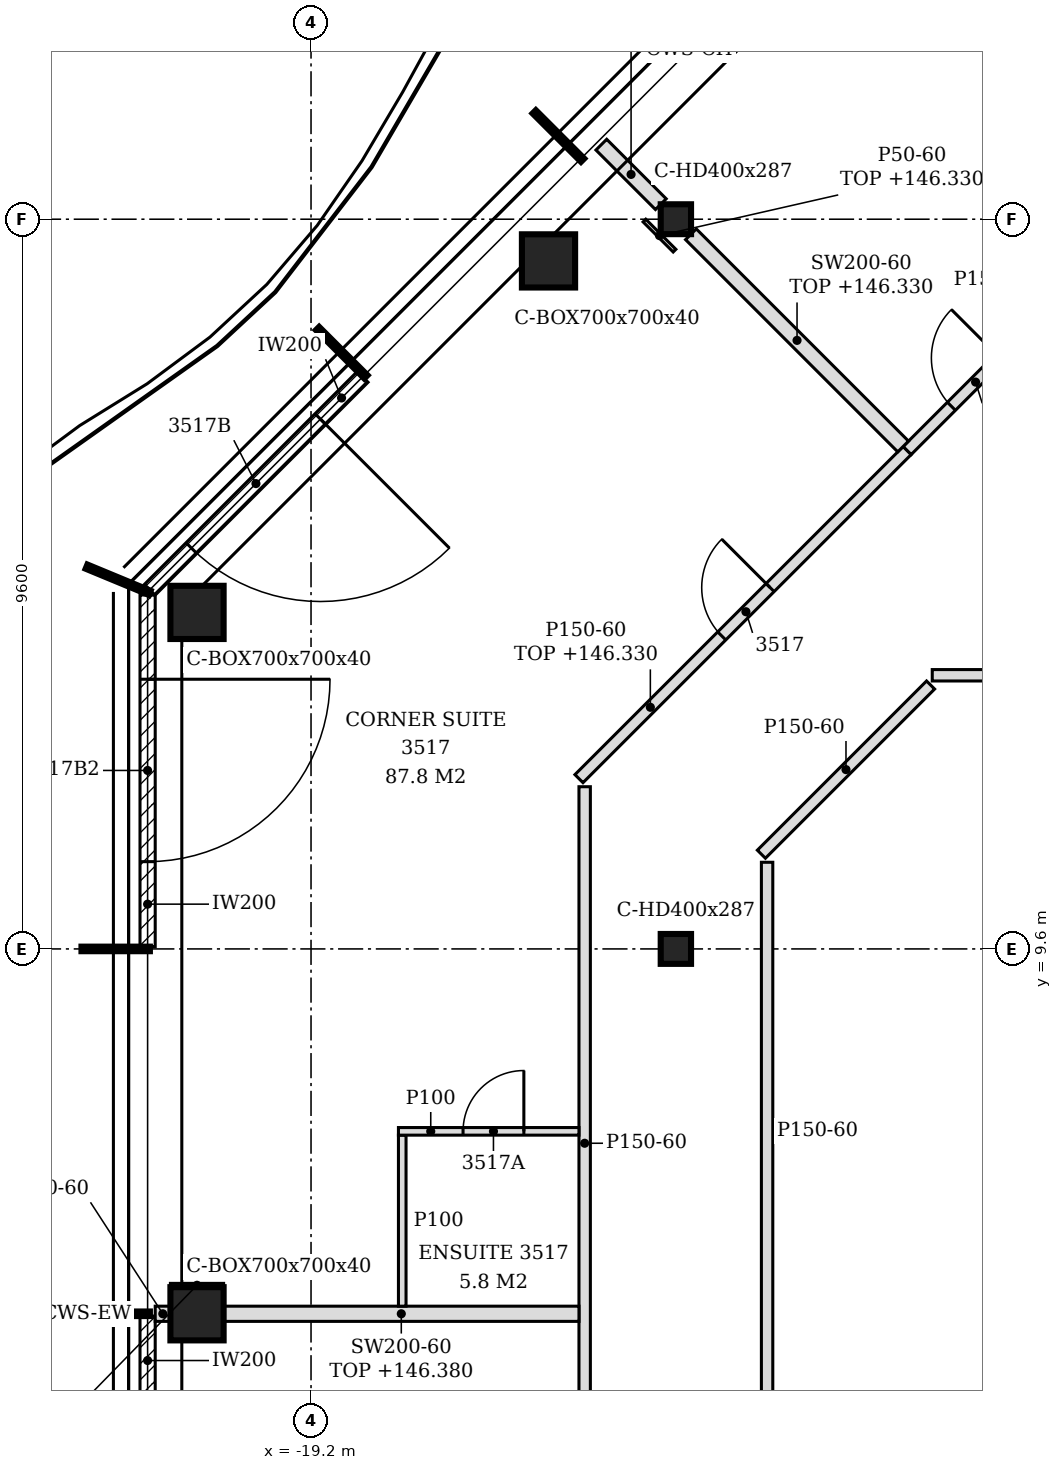
"""IFC4 building model, lengths in metres.
Left out: names, types, materials, properties, quantities, classifications, styles, units other than length and angle.
Written with IfcOpenShell. Run it as: python <this file> out.ifc"""

import sys

from ifc_helpers import new_model, si_unit, direction, frame, frame_2d, origin, origin_2d, place, context, subcontext, project, spatial, polyline, rectangle, hollow_rectangle, i_section, outline, extrude, element, fill, save


model = new_model("IFC4")
c1 = context("Model", 3, precision=1e-05, world=origin(), true_north=direction((0.0, 1.0)))
c2 = subcontext(c1, "Body", "Model", "MODEL_VIEW")
j1 = project(units=[si_unit("LENGTHUNIT", "METRE"), si_unit("PLANEANGLEUNIT", "RADIAN")], contexts=[c1])
p1 = place(None, origin())
s1 = spatial("IfcSite", under=j1, at=p1, CompositionType="ELEMENT")
p2 = place(p1, origin())
s2 = spatial("IfcBuilding", under=s1, at=p2, CompositionType="ELEMENT")
p3 = place(p2, frame((0.0, 0.0, 143.4)))
s3 = spatial("IfcBuildingStorey", under=s2, at=p3, CompositionType="ELEMENT", Elevation=143.4)
for number, where, z_axis, x_axis in (
    (1, (-16.076, 18.652, -0.15), (0.0, 0.0, 1.0), (1.0, 0.0, 0.0)),
    (2, (-20.7, 14.027, -0.15), (0.0, 0.0, 1.0), (1.0, 0.0, 0.0)),
    (3, (-20.7, 4.8, -0.15), (0.0, 0.0, 1.0), (1.0, 0.0, 0.0)),
):
    element("IfcColumn", number, at=place(p3, frame(where, z_axis=z_axis, x_axis=x_axis)), inside=s3, PredefinedType="COLUMN", context=c2, shape_type="SweptSolid", body=[
        extrude(hollow_rectangle(XDim=0.7, YDim=0.7, WallThickness=0.04, at=origin_2d()), origin(), (0.0, 0.0, 1.0), 3.6),
    ])
for number, where, z_axis, x_axis in (
    (4, (-14.4, 9.6, -0.15), (0.0, 0.0, 1.0), (1.0, 0.0, 0.0)),
    (5, (-14.4, 19.2, -0.15), (0.0, 0.0, 1.0), (1.0, 0.0, 0.0)),
):
    element("IfcColumn", number, at=place(p3, frame(where, z_axis=z_axis, x_axis=x_axis)), inside=s3, PredefinedType="COLUMN", context=c2, shape_type="SweptSolid", body=[
        extrude(i_section(OverallWidth=0.399, OverallDepth=0.393, WebThickness=0.023, FlangeThickness=0.037, FilletRadius=0.015, at=origin_2d()), origin(), (0.0, 0.0, 1.0), 3.6),
    ])
p4 = place(p3, frame((-18.521, 17.126, 0.0), z_axis=(0.0, 0.0, 1.0), x_axis=(-0.707106781187, -0.707106781187, 0.0)))
e6 = element("IfcWall", 6, at=p4, inside=s3, PredefinedType="NOTDEFINED", context=c2, shape_type="SweptSolid", body=[
    extrude(rectangle(XDim=3.962, YDim=0.2, at=frame_2d((1.981, 0.0))), origin(), (0.0, 0.0, 1.0), 3.45),
])
p5 = place(p4, frame((0.786, 0.0, 0.0)))
e7 = element("IfcOpeningElement", 7, at=p5, cuts=e6, PredefinedType="OPENING", context=c2, shape_type="SweptSolid", body=[
    extrude(rectangle(XDim=2.4, YDim=2.4, at=frame_2d((1.2, 1.2))), frame((0.0, 0.11, 0.0), z_axis=(0.0, -1.0, 0.0), x_axis=(1.0, 0.0, 0.0)), (0.0, 0.0, 1.0), 0.22),
])
p6 = place(p3, frame((-21.35, 14.256, 0.0), z_axis=(0.0, 0.0, 1.0), x_axis=(0.0, -1.0, 0.0)))
e8 = element("IfcWall", 8, at=p6, inside=s3, PredefinedType="NOTDEFINED", context=c2, shape_type="SweptSolid", body=[
    extrude(rectangle(XDim=4.626, YDim=0.2, at=frame_2d((2.313, 0.0))), origin(), (0.0, 0.0, 1.0), 3.45),
])
p7 = place(p6, frame((1.108, 0.0, 0.0)))
e9 = element("IfcOpeningElement", 9, at=p7, cuts=e8, PredefinedType="OPENING", context=c2, shape_type="SweptSolid", body=[
    extrude(rectangle(XDim=2.4, YDim=2.4, at=frame_2d((1.2, 1.2))), frame((0.0, 0.11, 0.0), z_axis=(0.0, -1.0, 0.0), x_axis=(1.0, 0.0, 0.0)), (0.0, 0.0, 1.0), 0.22),
])
p8 = place(p3, frame((-21.35, 4.77, 0.0), z_axis=(0.0, 0.0, 1.0), x_axis=(0.0, -1.0, 0.0)))
e10 = element("IfcWall", 10, at=p8, inside=s3, PredefinedType="NOTDEFINED", context=c2, shape_type="SweptSolid", body=[
    extrude(rectangle(XDim=4.74, YDim=0.2, at=frame_2d((2.37, 0.0))), origin(), (0.0, 0.0, 1.0), 3.45),
])
p9 = place(p8, frame((1.17, 0.0, 0.0)))
e11 = element("IfcOpeningElement", 11, at=p9, cuts=e10, PredefinedType="OPENING", context=c2, shape_type="SweptSolid", body=[
    extrude(rectangle(XDim=2.4, YDim=2.4, at=frame_2d((1.2, 1.2))), frame((0.0, 0.11, 0.0), z_axis=(0.0, -1.0, 0.0), x_axis=(1.0, 0.0, 0.0)), (0.0, 0.0, 1.0), 0.22),
])
p10 = place(p3, frame((-15.6, -1.1, 0.0), z_axis=(0.0, 0.0, 1.0), x_axis=(0.0, 1.0, 0.0)))
e12 = element("IfcWall", 12, at=p10, inside=s3, PredefinedType="PARTITIONING", context=c2, shape_type="SweptSolid", body=[
    extrude(outline(polyline([(0.0, 0.0), (12.834, 0.0), (12.834, 3.45), (10.795, 3.45), (10.793, 2.98), (10.605, 2.98), (10.603, 3.45), (5.995, 3.45), (5.993, 2.98), (5.805, 2.98), (5.803, 3.45), (1.195, 3.45), (1.193, 2.98), (1.005, 2.98), (1.003, 3.45), (0.0, 3.45), (0.0, 0.0)])), frame((0.0, 0.075, 0.0), z_axis=(0.0, -1.0, 0.0), x_axis=(1.0, 0.0, 0.0)), (0.0, 0.0, 1.0), 0.15),
])
p11 = place(p10, frame((2.553, 0.0, 0.0)))
e13 = element("IfcOpeningElement", 13, at=p11, cuts=e12, PredefinedType="OPENING", context=c2, shape_type="SweptSolid", body=[
    extrude(rectangle(XDim=0.9, YDim=2.1, at=frame_2d((0.45, 1.05))), frame((0.0, 0.085, 0.0), z_axis=(0.0, -1.0, 0.0), x_axis=(1.0, 0.0, 0.0)), (0.0, 0.0, 1.0), 0.17),
])
p12 = place(p3, frame((-13.2, 3.675, 0.0), z_axis=(0.0, 0.0, 1.0), x_axis=(0.0, 1.0, 0.0)))
e14 = element("IfcWall", 14, at=p12, inside=s3, PredefinedType="PARTITIONING", context=c2, shape_type="SweptSolid", body=[
    extrude(outline(polyline([(0.0, 0.0), (7.065, 0.0), (7.065, 3.45), (6.025, 3.45), (6.023, 2.93), (5.825, 2.93), (5.823, 3.45), (1.225, 3.45), (1.223, 2.93), (1.025, 2.93), (1.023, 3.45), (0.0, 3.45), (0.0, 0.0)])), frame((0.0, 0.075, 0.0), z_axis=(0.0, -1.0, 0.0), x_axis=(1.0, 0.0, 0.0)), (0.0, 0.0, 1.0), 0.15),
])
p13 = place(p3, frame((-21.25, 4.8, 0.0), z_axis=(0.0, 0.0, 1.0), x_axis=(1.0, 0.0, 0.0)))
e15 = element("IfcWall", 15, at=p13, inside=s3, PredefinedType="PARTITIONING", context=c2, shape_type="SweptSolid", body=[
    extrude(rectangle(XDim=0.2, YDim=0.2, at=frame_2d((0.1, 0.0))), origin(), (0.0, 0.0, 1.0), 3.45),
])
p14 = place(p3, frame((-20.35, 4.8, 0.0), z_axis=(0.0, 0.0, 1.0), x_axis=(1.0, 0.0, 0.0)))
e16 = element("IfcWall", 16, at=p14, inside=s3, PredefinedType="PARTITIONING", context=c2, shape_type="SweptSolid", body=[
    extrude(rectangle(XDim=4.675, YDim=0.2, at=frame_2d((2.337, 0.0))), origin(), (0.0, 0.0, 1.0), 2.98),
])
p15 = place(p3, frame((-18.0, 4.9, 0.0), z_axis=(0.0, 0.0, 1.0), x_axis=(0.0, 1.0, 0.0)))
e17 = element("IfcWall", 17, at=p15, inside=s3, PredefinedType="PARTITIONING", context=c2, shape_type="SweptSolid", body=[
    extrude(rectangle(XDim=2.25, YDim=0.1, at=frame_2d((1.125, 0.0))), origin(), (0.0, 0.0, 1.0), 3.45),
])
p16 = place(p3, frame((-18.05, 7.2, 0.0), z_axis=(0.0, 0.0, 1.0), x_axis=(1.0, 0.0, 0.0)))
e18 = element("IfcWall", 18, at=p16, inside=s3, PredefinedType="PARTITIONING", context=c2, shape_type="SweptSolid", body=[
    extrude(rectangle(XDim=2.375, YDim=0.1, at=frame_2d((1.188, 0.0))), origin(), (0.0, 0.0, 1.0), 3.45),
])
p17 = place(p16, frame((0.85, 0.0, 0.0)))
e19 = element("IfcOpeningElement", 19, at=p17, cuts=e18, PredefinedType="OPENING", context=c2, shape_type="SweptSolid", body=[
    extrude(rectangle(XDim=0.8, YDim=2.1, at=frame_2d((0.4, 1.05))), frame((0.0, 0.06, 0.0), z_axis=(0.0, -1.0, 0.0), x_axis=(1.0, 0.0, 0.0)), (0.0, 0.0, 1.0), 0.12),
])
p18 = place(p3, frame((-13.275, 10.846, 0.0), z_axis=(0.0, 0.0, 1.0), x_axis=(0.707068002674, 0.707145557572, 0.0)))
e20 = element("IfcWall", 20, at=p18, inside=s3, PredefinedType="PARTITIONING", context=c2, shape_type="SweptSolid", body=[
    extrude(rectangle(XDim=3.148, YDim=0.15, at=frame_2d((1.574, 0.0))), origin(), (0.0, 0.0, 1.0), 3.45),
])
p19 = place(p3, frame((-15.675, 11.84, 0.0), z_axis=(0.0, 0.0, 1.0), x_axis=(0.707206735496, 0.707006812746, 0.0)))
e21 = element("IfcWall", 21, at=p19, inside=s3, PredefinedType="PARTITIONING", context=c2, shape_type="SweptSolid", body=[
    extrude(rectangle(XDim=6.106, YDim=0.15, at=frame_2d((3.053, 0.0))), origin(), (0.0, 0.0, 1.0), 2.93),
])
p20 = place(p19, frame((2.656, 0.0, 0.0)))
e22 = element("IfcOpeningElement", 22, at=p20, cuts=e21, PredefinedType="OPENING", context=c2, shape_type="SweptSolid", body=[
    extrude(rectangle(XDim=0.9, YDim=2.1, at=frame_2d((0.45, 1.05))), frame((0.0, 0.085, 0.0), z_axis=(0.0, -1.0, 0.0), x_axis=(1.0, 0.0, 0.0)), (0.0, 0.0, 1.0), 0.17),
])
p21 = place(p3, frame((-11.027, 13.2, 0.0), z_axis=(0.0, 0.0, 1.0), x_axis=(1.0, 0.0, 0.0)))
e23 = element("IfcWall", 23, at=p21, inside=s3, PredefinedType="PARTITIONING", context=c2, shape_type="SweptSolid", body=[
    extrude(rectangle(XDim=4.212, YDim=0.15, at=frame_2d((2.106, 0.0))), origin(), (0.0, 0.0, 1.0), 3.45),
])
p22 = place(p3, frame((-11.357, 16.157, 0.0), z_axis=(0.0, 0.0, 1.0), x_axis=(0.707106781187, 0.707106781187, 0.0)))
e24 = element("IfcWall", 24, at=p22, inside=s3, PredefinedType="PARTITIONING", context=c2, shape_type="SweptSolid", body=[
    extrude(rectangle(XDim=3.071, YDim=0.15, at=frame_2d((1.535, 0.0))), origin(), (0.0, 0.0, 1.0), 3.45),
])
p23 = place(p22, frame((0.823, 0.0, 0.0)))
e25 = element("IfcOpeningElement", 25, at=p23, cuts=e24, PredefinedType="OPENING", context=c2, shape_type="SweptSolid", body=[
    extrude(rectangle(XDim=0.9, YDim=2.1, at=frame_2d((0.45, 1.05))), frame((0.0, 0.085, 0.0), z_axis=(0.0, -1.0, 0.0), x_axis=(1.0, 0.0, 0.0)), (0.0, 0.0, 1.0), 0.17),
])
p24 = place(p3, frame((-11.41, 16.21, 0.0), z_axis=(0.0, 0.0, 1.0), x_axis=(-0.707106781187, 0.707106781187, 0.0)))
e26 = element("IfcWall", 26, at=p24, inside=s3, PredefinedType="PARTITIONING", context=c2, shape_type="SweptSolid", body=[
    extrude(rectangle(XDim=3.948, YDim=0.2, at=frame_2d((1.974, 0.0))), origin(), (0.0, 0.0, 1.0), 2.93),
])
p25 = place(p3, frame((-14.598, 19.398, 0.0), z_axis=(0.0, 0.0, 1.0), x_axis=(-0.707106781187, 0.707106781187, 0.0)))
e27 = element("IfcWall", 27, at=p25, inside=s3, PredefinedType="PARTITIONING", context=c2, shape_type="SweptSolid", body=[
    extrude(rectangle(XDim=1.107, YDim=0.2, at=frame_2d((0.554, 0.0))), origin(), (0.0, 0.0, 1.0), 2.63),
])
p26 = place(p3, frame((-9.542, 21.367, 0.0), z_axis=(0.0, 0.0, 1.0), x_axis=(-0.707217500167, 0.706996044867, 0.0)))
e28 = element("IfcWall", 28, at=p26, inside=s3, PredefinedType="PARTITIONING", context=c2, shape_type="SweptSolid", body=[
    extrude(rectangle(XDim=2.205, YDim=0.2, at=frame_2d((1.103, 0.0))), origin(), (0.0, 0.0, 1.0), 3.45),
])
p27 = place(p3, frame((-21.05, 5.175, 0.0), z_axis=(0.0, 0.0, 1.0), x_axis=(1.0, 0.0, 0.0)))
e29 = element("IfcWall", 29, at=p27, inside=s3, PredefinedType="PARTITIONING", context=c2, shape_type="SweptSolid", body=[
    extrude(rectangle(XDim=0.7, YDim=0.05, at=frame_2d((0.35, 0.0))), origin(), (0.0, 0.0, 1.0), 2.93),
])
p28 = place(p3, frame((-14.418, 18.786, 0.0), z_axis=(0.0, 0.0, 1.0), x_axis=(-0.707106781187, 0.707106781187, 0.0)))
e30 = element("IfcWall", 30, at=p28, inside=s3, PredefinedType="PARTITIONING", context=c2, shape_type="SweptSolid", body=[
    extrude(rectangle(XDim=0.56, YDim=0.05, at=frame_2d((0.28, 0.0))), origin(), (0.0, 0.0, 1.0), 2.93),
])
p29 = place(p5, origin())
e31 = element("IfcDoor", 31, at=p29, inside=s3, OperationType="SINGLE_SWING_LEFT", PredefinedType="DOOR", context=c2, shape_type="SweptSolid", body=[
    extrude(rectangle(XDim=2.4, YDim=2.4, at=frame_2d((1.2, 1.2))), frame((0.0, 0.025, 0.0), z_axis=(0.0, -1.0, 0.0), x_axis=(1.0, 0.0, 0.0)), (0.0, 0.0, 1.0), 0.05),
])
fill(e7, e31)
p30 = place(p7, origin())
e32 = element("IfcDoor", 32, at=p30, inside=s3, OperationType="SINGLE_SWING_LEFT", PredefinedType="DOOR", context=c2, shape_type="SweptSolid", body=[
    extrude(rectangle(XDim=2.4, YDim=2.4, at=frame_2d((1.2, 1.2))), frame((0.0, 0.025, 0.0), z_axis=(0.0, -1.0, 0.0), x_axis=(1.0, 0.0, 0.0)), (0.0, 0.0, 1.0), 0.05),
])
fill(e9, e32)
p31 = place(p23, origin())
e33 = element("IfcDoor", 33, at=p31, inside=s3, OperationType="SINGLE_SWING_RIGHT", PredefinedType="DOOR", context=c2, shape_type="SweptSolid", body=[
    extrude(rectangle(XDim=0.9, YDim=2.1, at=frame_2d((0.45, 1.05))), frame((0.0, 0.025, 0.0), z_axis=(0.0, -1.0, 0.0), x_axis=(1.0, 0.0, 0.0)), (0.0, 0.0, 1.0), 0.05),
])
fill(e25, e33)
p32 = place(p20, origin())
e34 = element("IfcDoor", 34, at=p32, inside=s3, OperationType="SINGLE_SWING_RIGHT", PredefinedType="DOOR", context=c2, shape_type="SweptSolid", body=[
    extrude(rectangle(XDim=0.9, YDim=2.1, at=frame_2d((0.45, 1.05))), frame((0.0, 0.025, 0.0), z_axis=(0.0, -1.0, 0.0), x_axis=(1.0, 0.0, 0.0)), (0.0, 0.0, 1.0), 0.05),
])
fill(e22, e34)
p33 = place(p17, origin())
e35 = element("IfcDoor", 35, at=p33, inside=s3, OperationType="SINGLE_SWING_RIGHT", PredefinedType="DOOR", context=c2, shape_type="SweptSolid", body=[
    extrude(rectangle(XDim=0.8, YDim=2.1, at=frame_2d((0.4, 1.05))), frame((0.0, 0.025, 0.0), z_axis=(0.0, -1.0, 0.0), x_axis=(1.0, 0.0, 0.0)), (0.0, 0.0, 1.0), 0.05),
])
fill(e19, e35)
save(model, sys.argv[1])
